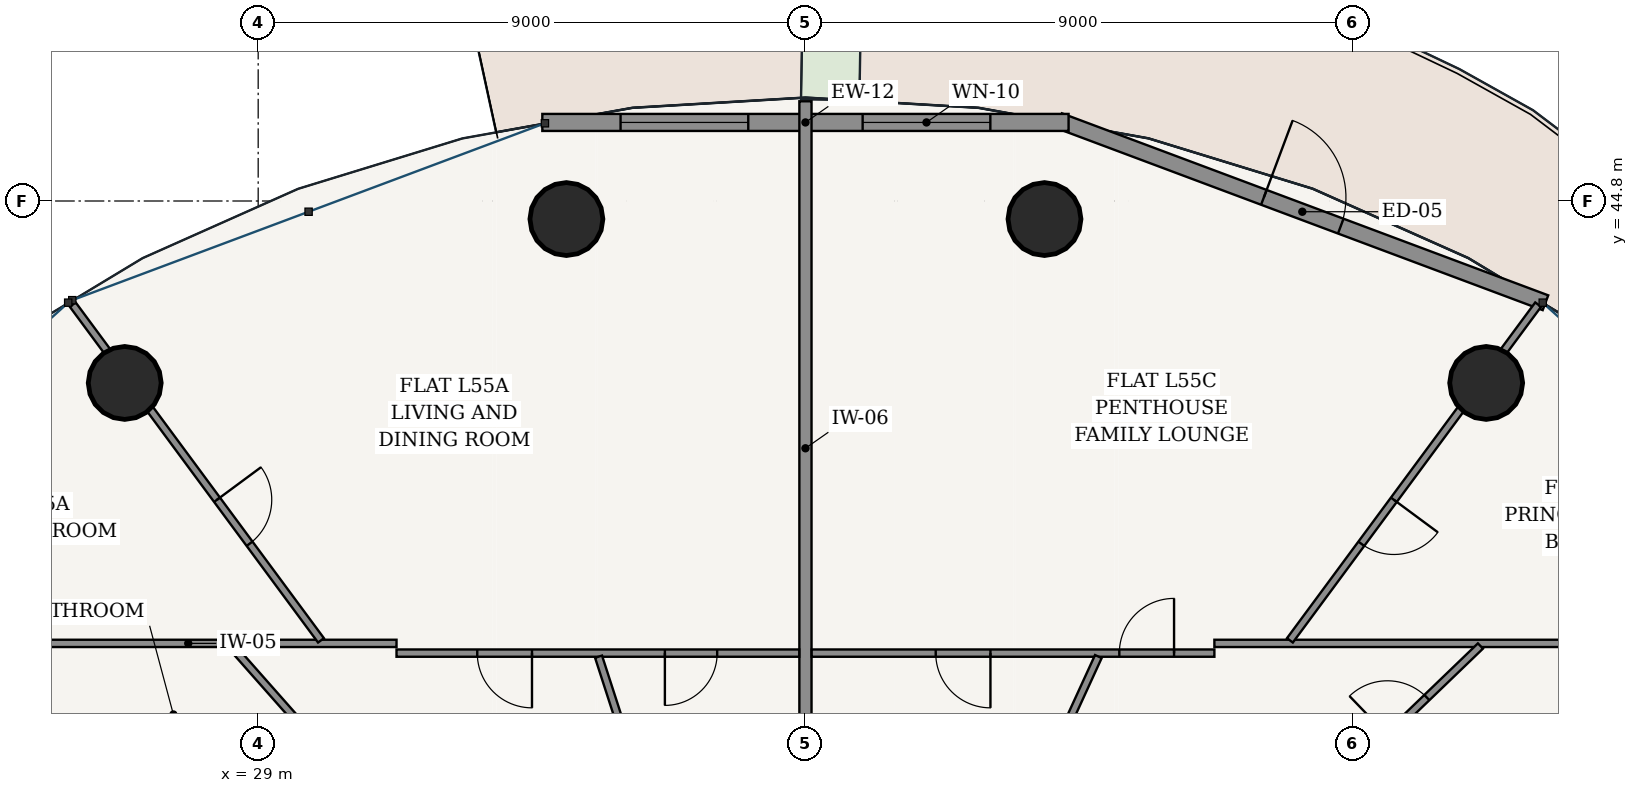
"""IFC4 building model, lengths in metres.
Left out: names, types, materials, properties, quantities, classifications, styles, units other than length and angle.
Written with IfcOpenShell. Run it as: python <this file> out.ifc"""

import sys

from ifc_helpers import new_model, si_unit, direction, frame, frame_2d, origin, origin_2d, place, context, subcontext, project, spatial, rectangle, hollow_circle, extrude, source, transform, mapped, element, fill, save


model = new_model("IFC4")
c1 = context("Model", 3, precision=1e-05, world=origin(), true_north=direction((-0.2419218956, 0.970295726276)))
c2 = subcontext(c1, "Body", "Model", "MODEL_VIEW")
j1 = project(units=[si_unit("LENGTHUNIT", "METRE"), si_unit("PLANEANGLEUNIT", "RADIAN")], contexts=[c1])
p1 = place(None, origin())
s1 = spatial("IfcSite", under=j1, at=p1, CompositionType="ELEMENT")
p2 = place(p1, origin())
s2 = spatial("IfcBuilding", under=s1, at=p2, CompositionType="ELEMENT")
p3 = place(p2, frame((0.0, 0.0, 209.7)))
s3 = spatial("IfcBuildingStorey", under=s2, at=p3, CompositionType="ELEMENT", Elevation=209.7)
for number, where, z_axis, x_axis in (
    (1, (49.195, 41.808, 0.0), (0.0, 0.0, 1.0), (1.0, 0.0, 0.0)),
    (2, (41.931, 44.503, 0.0), (0.0, 0.0, 1.0), (1.0, 0.0, 0.0)),
    (3, (34.069, 44.503, 0.0), (0.0, 0.0, 1.0), (1.0, 0.0, 0.0)),
    (4, (26.805, 41.808, 0.0), (0.0, 0.0, 1.0), (1.0, 0.0, 0.0)),
):
    element("IfcColumn", number, at=place(p3, frame(where, z_axis=z_axis, x_axis=x_axis)), inside=s3, PredefinedType="COLUMN", context=c2, shape_type="SweptSolid", body=[
        extrude(hollow_circle(Radius=0.6, WallThickness=0.038, at=origin_2d()), origin(), (0.0, 0.0, 1.0), 3.7),
    ])
p4 = place(p3, frame((50.17, 43.127, 0.0), z_axis=(0.0, 0.0, 1.0), x_axis=(-0.936556918375, 0.350515532672, 0.0)))
e5 = element("IfcWall", 5, at=p4, inside=s3, PredefinedType="SOLIDWALL", context=c2, shape_type="SweptSolid", body=[
    extrude(rectangle(XDim=8.539, YDim=0.26, at=frame_2d((4.27, 0.0))), origin(), (0.0, 0.0, 1.0), 3.435),
])
p5 = place(p4, frame((3.594, 0.0, 0.0)))
e6 = element("IfcOpeningElement", 6, at=p5, cuts=e5, PredefinedType="OPENING", context=c2, shape_type="SweptSolid", body=[
    extrude(rectangle(XDim=1.35, YDim=2.2, at=frame_2d((0.675, 1.1))), frame((0.0, 0.14, 0.0), z_axis=(0.0, -1.0, 0.0), x_axis=(1.0, 0.0, 0.0)), (0.0, 0.0, 1.0), 0.28),
])
p6 = place(p3, frame((42.327, 46.092, 0.0), z_axis=(0.0, 0.0, 1.0), x_axis=(-1.0, 0.0, 0.0)))
e7 = element("IfcWall", 7, at=p6, inside=s3, PredefinedType="SOLIDWALL", context=c2, shape_type="SweptSolid", body=[
    extrude(rectangle(XDim=8.654, YDim=0.28, at=frame_2d((4.327, 0.0))), origin(), (0.0, 0.0, 1.0), 3.435),
])
p7 = place(p6, frame((1.287, 0.0, 0.85)))
e8 = element("IfcOpeningElement", 8, at=p7, cuts=e7, PredefinedType="OPENING", context=c2, shape_type="SweptSolid", body=[
    extrude(rectangle(XDim=2.1, YDim=1.95, at=frame_2d((1.05, 0.975))), frame((0.0, 0.15, 0.0), z_axis=(0.0, -1.0, 0.0), x_axis=(1.0, 0.0, 0.0)), (0.0, 0.0, 1.0), 0.3),
])
p8 = place(p6, frame((5.268, 0.0, 0.85)))
e9 = element("IfcOpeningElement", 9, at=p8, cuts=e7, PredefinedType="OPENING", context=c2, shape_type="SweptSolid", body=[
    extrude(rectangle(XDim=2.1, YDim=1.95, at=frame_2d((1.05, 0.975))), frame((0.0, 0.15, 0.0), z_axis=(0.0, -1.0, 0.0), x_axis=(1.0, 0.0, 0.0)), (0.0, 0.0, 1.0), 0.3),
])
p9 = place(p3, frame((38.0, 35.027, 0.0), z_axis=(0.0, 0.0, 1.0), x_axis=(0.0, 1.0, 0.0)))
e10 = element("IfcWall", 10, at=p9, inside=s3, PredefinedType="PARTITIONING", context=c2, shape_type="SweptSolid", body=[
    extrude(rectangle(XDim=11.413, YDim=0.2, at=frame_2d((5.707, 0.0))), origin(), (0.0, 0.0, 1.0), 2.52),
])
p10 = place(p3, frame((24.425, 37.525, 0.0), z_axis=(0.0, 0.0, 1.0), x_axis=(1.0, 0.0, 0.0)))
e11 = element("IfcWall", 11, at=p10, inside=s3, PredefinedType="PARTITIONING", context=c2, shape_type="SweptSolid", body=[
    extrude(rectangle(XDim=6.85, YDim=0.12, at=frame_2d((3.425, 0.0))), origin(), (0.0, 0.0, 1.0), 2.951),
])
p11 = place(p3, frame((31.275, 37.365, 0.0), z_axis=(0.0, 0.0, 1.0), x_axis=(1.0, 0.0, 0.0)))
e12 = element("IfcWall", 12, at=p11, inside=s3, PredefinedType="PARTITIONING", context=c2, shape_type="SweptSolid", body=[
    extrude(rectangle(XDim=6.623, YDim=0.12, at=frame_2d((3.312, 0.0))), origin(), (0.0, 0.0, 1.0), 2.951),
])
p12 = place(p11, frame((4.413, 0.0, 0.0)))
e13 = element("IfcOpeningElement", 13, at=p12, cuts=e12, PredefinedType="OPENING", context=c2, shape_type="SweptSolid", body=[
    extrude(rectangle(XDim=0.86, YDim=2.15, at=frame_2d((0.43, 1.075))), frame((0.0, 0.07, 0.0), z_axis=(0.0, -1.0, 0.0), x_axis=(1.0, 0.0, 0.0)), (0.0, 0.0, 1.0), 0.14),
])
p13 = place(p11, frame((1.328, 0.0, 0.0)))
e14 = element("IfcOpeningElement", 14, at=p13, cuts=e12, PredefinedType="OPENING", context=c2, shape_type="SweptSolid", body=[
    extrude(rectangle(XDim=0.9, YDim=2.15, at=frame_2d((0.45, 1.075))), frame((0.0, 0.07, 0.0), z_axis=(0.0, -1.0, 0.0), x_axis=(1.0, 0.0, 0.0)), (0.0, 0.0, 1.0), 0.14),
])
p14 = place(p3, frame((30.033, 37.575, 0.0), z_axis=(0.0, 0.0, 1.0), x_axis=(-0.59452500855, 0.804077119565, 0.0)))
e15 = element("IfcWall", 15, at=p14, inside=s3, PredefinedType="PARTITIONING", context=c2, shape_type="SweptSolid", body=[
    extrude(rectangle(XDim=6.867, YDim=0.12, at=frame_2d((3.434, 0.0))), origin(), (0.0, 0.0, 1.0), 2.951),
])
p15 = place(p14, frame((1.976, 0.0, 0.0)))
e16 = element("IfcOpeningElement", 16, at=p15, cuts=e15, PredefinedType="OPENING", context=c2, shape_type="SweptSolid", body=[
    extrude(rectangle(XDim=0.9, YDim=2.15, at=frame_2d((0.45, 1.075))), frame((0.0, 0.07, 0.0), z_axis=(0.0, -1.0, 0.0), x_axis=(1.0, 0.0, 0.0)), (0.0, 0.0, 1.0), 0.14),
])
p16 = place(p3, frame((35.336, 35.027, 0.0), z_axis=(0.0, 0.0, 1.0), x_axis=(-0.308083476138, 0.951359328398, 0.0)))
e17 = element("IfcWall", 17, at=p16, inside=s3, PredefinedType="PARTITIONING", context=c2, shape_type="SweptSolid", body=[
    extrude(rectangle(XDim=2.396, YDim=0.12, at=frame_2d((1.198, 0.0))), origin(), (0.0, 0.0, 1.0), 2.52),
])
p17 = place(p3, frame((30.726, 35.027, 0.0), z_axis=(0.0, 0.0, 1.0), x_axis=(-0.662398427862, 0.749151735475, 0.0)))
e18 = element("IfcWall", 18, at=p17, inside=s3, PredefinedType="PARTITIONING", context=c2, shape_type="SweptSolid", body=[
    extrude(rectangle(XDim=3.273, YDim=0.12, at=frame_2d((1.636, 0.0))), origin(), (0.0, 0.0, 1.0), 3.435),
])
p18 = place(p3, frame((38.102, 37.365, 0.0), z_axis=(0.0, 0.0, 1.0), x_axis=(1.0, 0.0, 0.0)))
e19 = element("IfcWall", 19, at=p18, inside=s3, PredefinedType="PARTITIONING", context=c2, shape_type="SweptSolid", body=[
    extrude(rectangle(XDim=6.623, YDim=0.12, at=frame_2d((3.312, 0.0))), origin(), (0.0, 0.0, 1.0), 2.951),
])
p19 = place(p18, frame((5.06, 0.0, 0.0)))
e20 = element("IfcOpeningElement", 20, at=p19, cuts=e19, PredefinedType="OPENING", context=c2, shape_type="SweptSolid", body=[
    extrude(rectangle(XDim=0.9, YDim=2.15, at=frame_2d((0.45, 1.075))), frame((0.0, 0.07, 0.0), z_axis=(0.0, -1.0, 0.0), x_axis=(1.0, 0.0, 0.0)), (0.0, 0.0, 1.0), 0.14),
])
p20 = place(p18, frame((2.04, 0.0, 0.0)))
e21 = element("IfcOpeningElement", 21, at=p20, cuts=e19, PredefinedType="OPENING", context=c2, shape_type="SweptSolid", body=[
    extrude(rectangle(XDim=0.9, YDim=2.15, at=frame_2d((0.45, 1.075))), frame((0.0, 0.07, 0.0), z_axis=(0.0, -1.0, 0.0), x_axis=(1.0, 0.0, 0.0)), (0.0, 0.0, 1.0), 0.14),
])
p21 = place(p3, frame((44.725, 37.525, 0.0), z_axis=(0.0, 0.0, 1.0), x_axis=(1.0, 0.0, 0.0)))
e22 = element("IfcWall", 22, at=p21, inside=s3, PredefinedType="PARTITIONING", context=c2, shape_type="SweptSolid", body=[
    extrude(rectangle(XDim=6.85, YDim=0.12, at=frame_2d((3.425, 0.0))), origin(), (0.0, 0.0, 1.0), 2.951),
])
p22 = place(p3, frame((45.967, 37.575, 0.0), z_axis=(0.0, 0.0, 1.0), x_axis=(0.59452500855, 0.804077119565, 0.0)))
e23 = element("IfcWall", 23, at=p22, inside=s3, PredefinedType="PARTITIONING", context=c2, shape_type="SweptSolid", body=[
    extrude(rectangle(XDim=6.867, YDim=0.12, at=frame_2d((3.434, 0.0))), origin(), (0.0, 0.0, 1.0), 2.951),
])
p23 = place(p22, frame((1.975, 0.0, 0.0)))
e24 = element("IfcOpeningElement", 24, at=p23, cuts=e23, PredefinedType="OPENING", context=c2, shape_type="SweptSolid", body=[
    extrude(rectangle(XDim=0.9, YDim=2.15, at=frame_2d((0.45, 1.075))), frame((0.0, 0.07, 0.0), z_axis=(0.0, -1.0, 0.0), x_axis=(1.0, 0.0, 0.0)), (0.0, 0.0, 1.0), 0.14),
])
p24 = place(p3, frame((46.549, 35.026, 0.0), z_axis=(0.0, 0.0, 1.0), x_axis=(0.720557461206, 0.693395230082, 0.0)))
e25 = element("IfcWall", 25, at=p24, inside=s3, PredefinedType="PARTITIONING", context=c2, shape_type="SweptSolid", body=[
    extrude(rectangle(XDim=3.541, YDim=0.12, at=frame_2d((1.771, 0.0))), origin(), (0.0, 0.0, 1.0), 2.951),
])
p25 = place(p24, frame((1.419, 0.0, 0.0)))
e26 = element("IfcOpeningElement", 26, at=p25, cuts=e25, PredefinedType="OPENING", context=c2, shape_type="SweptSolid", body=[
    extrude(rectangle(XDim=0.9, YDim=2.15, at=frame_2d((0.45, 1.075))), frame((0.0, 0.07, 0.0), z_axis=(0.0, -1.0, 0.0), x_axis=(1.0, 0.0, 0.0)), (0.0, 0.0, 1.0), 0.14),
])
p26 = place(p3, frame((41.771, 35.027, 0.0), z_axis=(0.0, 0.0, 1.0), x_axis=(0.416688202143, 0.909049471808, 0.0)))
e27 = element("IfcWall", 27, at=p26, inside=s3, PredefinedType="PARTITIONING", context=c2, shape_type="SweptSolid", body=[
    extrude(rectangle(XDim=2.51, YDim=0.12, at=frame_2d((1.255, 0.0))), origin(), (0.0, 0.0, 1.0), 3.435),
])
m1 = source(origin(), c2, "Body", "SweptSolid", [
    extrude(rectangle(XDim=1.35, YDim=2.2, at=frame_2d((0.675, 1.1))), frame((0.0, 0.025, 0.0), z_axis=(0.0, -1.0, 0.0), x_axis=(1.0, 0.0, 0.0)), (0.0, 0.0, 1.0), 0.05),
])
p27 = place(p5, frame((1.35, 0.0, 0.0), z_axis=(0.0, 0.0, 1.0), x_axis=(-1.0, 0.0, 0.0)))
e28 = element("IfcDoor", 28, at=p27, inside=s3, OperationType="SINGLE_SWING_LEFT", PredefinedType="DOOR", context=c2, shape_type="MappedRepresentation", body=[
    mapped(m1, transform((0.0, 0.0, 0.0), scale=1.0)),
])
fill(e6, e28)
m2 = source(origin(), c2, "Body", "SweptSolid", [
    extrude(rectangle(XDim=2.1, YDim=1.95, at=frame_2d((1.05, 0.975))), frame((0.0, 0.03, 0.0), z_axis=(0.0, -1.0, 0.0), x_axis=(1.0, 0.0, 0.0)), (0.0, 0.0, 1.0), 0.06),
])
p28 = place(p7, origin())
e29 = element("IfcWindow", 29, at=p28, inside=s3, PartitioningType="SINGLE_PANEL", PredefinedType="WINDOW", context=c2, shape_type="MappedRepresentation", body=[
    mapped(m2, transform((0.0, 0.0, 0.0), scale=1.0)),
])
fill(e8, e29)
p29 = place(p8, origin())
e30 = element("IfcWindow", 30, at=p29, inside=s3, PartitioningType="SINGLE_PANEL", PredefinedType="WINDOW", context=c2, shape_type="MappedRepresentation", body=[
    mapped(m2, transform((0.0, 0.0, 0.0), scale=1.0)),
])
fill(e9, e30)
m3 = source(origin(), c2, "Body", "SweptSolid", [
    extrude(rectangle(XDim=0.9, YDim=2.15, at=frame_2d((0.45, 1.075))), frame((0.0, 0.025, 0.0), z_axis=(0.0, -1.0, 0.0), x_axis=(1.0, 0.0, 0.0)), (0.0, 0.0, 1.0), 0.05),
])
p30 = place(p15, frame((0.9, 0.0, 0.0), z_axis=(0.0, 0.0, 1.0), x_axis=(-1.0, 0.0, 0.0)))
e31 = element("IfcDoor", 31, at=p30, inside=s3, OperationType="SINGLE_SWING_LEFT", PredefinedType="DOOR", context=c2, shape_type="MappedRepresentation", body=[
    mapped(m3, transform((0.0, 0.0, 0.0), scale=1.0)),
])
fill(e16, e31)
m4 = source(origin(), c2, "Body", "SweptSolid", [
    extrude(rectangle(XDim=0.86, YDim=2.15, at=frame_2d((0.43, 1.075))), frame((0.0, 0.025, 0.0), z_axis=(0.0, -1.0, 0.0), x_axis=(1.0, 0.0, 0.0)), (0.0, 0.0, 1.0), 0.05),
])
p31 = place(p12, frame((0.86, 0.0, 0.0), z_axis=(0.0, 0.0, 1.0), x_axis=(-1.0, 0.0, 0.0)))
e32 = element("IfcDoor", 32, at=p31, inside=s3, OperationType="SINGLE_SWING_RIGHT", PredefinedType="DOOR", context=c2, shape_type="MappedRepresentation", body=[
    mapped(m4, transform((0.0, 0.0, 0.0), scale=1.0)),
])
fill(e13, e32)
p32 = place(p13, frame((0.9, 0.0, 0.0), z_axis=(0.0, 0.0, 1.0), x_axis=(-1.0, 0.0, 0.0)))
e33 = element("IfcDoor", 33, at=p32, inside=s3, OperationType="SINGLE_SWING_LEFT", PredefinedType="DOOR", context=c2, shape_type="MappedRepresentation", body=[
    mapped(m3, transform((0.0, 0.0, 0.0), scale=1.0)),
])
fill(e14, e33)
p33 = place(p25, origin())
e34 = element("IfcDoor", 34, at=p33, inside=s3, OperationType="SINGLE_SWING_LEFT", PredefinedType="DOOR", context=c2, shape_type="MappedRepresentation", body=[
    mapped(m3, transform((0.0, 0.0, 0.0), scale=1.0)),
])
fill(e26, e34)
p34 = place(p19, origin())
e35 = element("IfcDoor", 35, at=p34, inside=s3, OperationType="SINGLE_SWING_RIGHT", PredefinedType="DOOR", context=c2, shape_type="MappedRepresentation", body=[
    mapped(m3, transform((0.0, 0.0, 0.0), scale=1.0)),
])
fill(e20, e35)
p35 = place(p20, frame((0.9, 0.0, 0.0), z_axis=(0.0, 0.0, 1.0), x_axis=(-1.0, 0.0, 0.0)))
e36 = element("IfcDoor", 36, at=p35, inside=s3, OperationType="SINGLE_SWING_LEFT", PredefinedType="DOOR", context=c2, shape_type="MappedRepresentation", body=[
    mapped(m3, transform((0.0, 0.0, 0.0), scale=1.0)),
])
fill(e21, e36)
p36 = place(p23, frame((0.9, 0.0, 0.0), z_axis=(0.0, 0.0, 1.0), x_axis=(-1.0, 0.0, 0.0)))
e37 = element("IfcDoor", 37, at=p36, inside=s3, OperationType="SINGLE_SWING_LEFT", PredefinedType="DOOR", context=c2, shape_type="MappedRepresentation", body=[
    mapped(m3, transform((0.0, 0.0, 0.0), scale=1.0)),
])
fill(e24, e37)
save(model, sys.argv[1])
